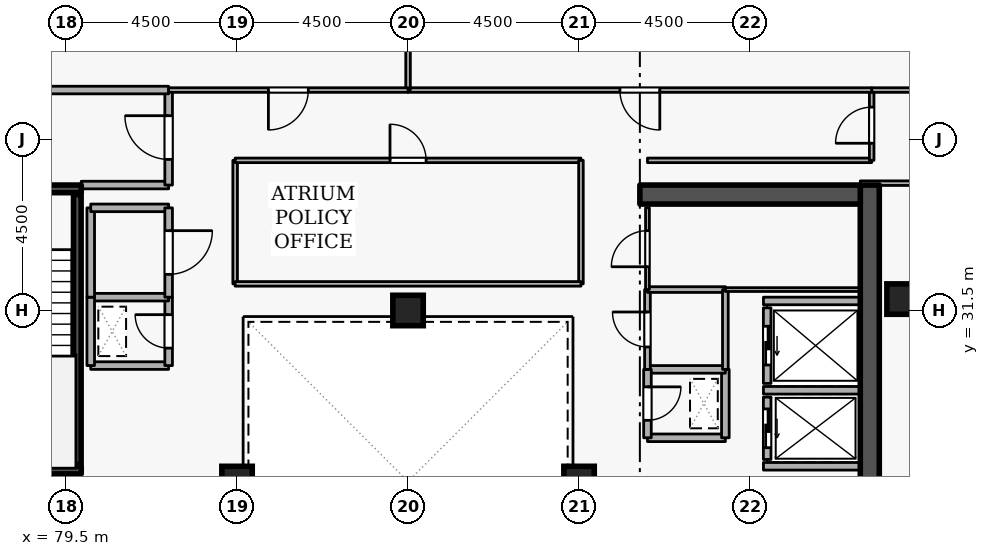
"""IFC4 building model, lengths in metres.
Left out: names, types, materials, properties, quantities, classifications, styles, units other than length and angle.
Written with IfcOpenShell. Run it as: python <this file> out.ifc"""

import sys

from ifc_helpers import new_model, si_unit, direction, frame, frame_2d, origin, origin_2d, place, context, subcontext, project, spatial, rectangle, extrude, element, fill, save


model = new_model("IFC4")
c1 = context("Model", 3, precision=1e-05, world=origin(), true_north=direction((0.0, 1.0)))
c2 = subcontext(c1, "Body", "Model", "MODEL_VIEW")
j1 = project(units=[si_unit("LENGTHUNIT", "METRE"), si_unit("PLANEANGLEUNIT", "RADIAN")], contexts=[c1])
p1 = place(None, origin())
s1 = spatial("IfcSite", under=j1, at=p1, CompositionType="ELEMENT")
p2 = place(p1, origin())
s2 = spatial("IfcBuilding", under=s1, at=p2, CompositionType="ELEMENT")
p3 = place(p2, frame((0.0, 0.0, 254.7)))
s3 = spatial("IfcBuildingStorey", under=s2, at=p3, CompositionType="ELEMENT", Elevation=254.7)
p4 = place(p3, frame((100.65, 19.2, 0.0), z_axis=(0.0, 0.0, 1.0), x_axis=(0.0, 1.0, 0.0)))
e1 = element("IfcWall", 1, at=p4, inside=s3, PredefinedType="SHEAR", context=c2, shape_type="SweptSolid", body=[
    extrude(rectangle(XDim=15.6, YDim=0.5, at=frame_2d((7.8, 0.0))), origin(), (0.0, 0.0, 1.0), 3.6),
])
p5 = place(p3, frame((94.6, 34.55, 0.0), z_axis=(0.0, 0.0, 1.0), x_axis=(1.0, 0.0, 0.0)))
e2 = element("IfcWall", 2, at=p5, inside=s3, PredefinedType="SHEAR", context=c2, shape_type="SweptSolid", body=[
    extrude(rectangle(XDim=5.8, YDim=0.5, at=frame_2d((2.9, 0.0))), origin(), (0.0, 0.0, 1.0), 3.6),
])
for number, where, z_axis, x_axis in (
    (3, (101.5, 31.8, 0.0), (0.0, 0.0, 1.0), (1.0, 0.0, 0.0)),
    (4, (93.0, 27.0, 0.0), (0.0, 0.0, 1.0), (1.0, 0.0, 0.0)),
    (5, (84.0, 27.0, 0.0), (0.0, 0.0, 1.0), (1.0, 0.0, 0.0)),
    (6, (88.5, 31.5, 0.0), (0.0, 0.0, 1.0), (1.0, 0.0, 0.0)),
):
    element("IfcColumn", number, at=place(p3, frame(where, z_axis=z_axis, x_axis=x_axis)), inside=s3, PredefinedType="COLUMN", context=c2, shape_type="SweptSolid", body=[
        extrude(rectangle(XDim=0.8, YDim=0.8, at=origin_2d()), origin(), (0.0, 0.0, 1.0), 3.6),
    ])
p6 = place(p3, frame((97.95, 29.22, 0.0), z_axis=(0.0, 0.0, 1.0), x_axis=(0.0, -1.0, 0.0)))
e7 = element("IfcWall", 7, at=p6, inside=s3, PredefinedType="STANDARD", context=c2, shape_type="SweptSolid", body=[
    extrude(rectangle(XDim=1.64, YDim=0.2, at=frame_2d((0.82, 0.0))), origin(), (0.0, 0.0, 1.0), 3.32),
])
p7 = place(p6, frame((0.31, 0.0, 0.0)))
e8 = element("IfcOpeningElement", 8, at=p7, cuts=e7, PredefinedType="OPENING", context=c2, shape_type="SweptSolid", body=[
    extrude(rectangle(XDim=1.02, YDim=2.06, at=frame_2d((0.51, 1.03))), frame((0.0, 0.11, 0.0), z_axis=(0.0, -1.0, 0.0), x_axis=(1.0, 0.0, 0.0)), (0.0, 0.0, 1.0), 0.22),
])
p8 = place(p3, frame((97.95, 31.57, 0.0), z_axis=(0.0, 0.0, 1.0), x_axis=(0.0, -1.0, 0.0)))
e9 = element("IfcWall", 9, at=p8, inside=s3, PredefinedType="STANDARD", context=c2, shape_type="SweptSolid", body=[
    extrude(rectangle(XDim=1.99, YDim=0.2, at=frame_2d((0.995, 0.0))), origin(), (0.0, 0.0, 1.0), 3.32),
])
p9 = place(p8, frame((0.485, 0.0, 0.0)))
e10 = element("IfcOpeningElement", 10, at=p9, cuts=e9, PredefinedType="OPENING", context=c2, shape_type="SweptSolid", body=[
    extrude(rectangle(XDim=1.02, YDim=2.06, at=frame_2d((0.51, 1.03))), frame((0.0, 0.11, 0.0), z_axis=(0.0, -1.0, 0.0), x_axis=(1.0, 0.0, 0.0)), (0.0, 0.0, 1.0), 0.22),
])
for number, where, z_axis, x_axis in (
    (11, (97.852, 29.4, 0.0), (0.0, 0.0, 1.0), (1.0, 0.0, 0.0)),
    (12, (97.852, 27.4, 0.0), (0.0, 0.0, 1.0), (1.0, 0.0, 0.0)),
    (13, (97.852, 31.75, 0.0), (0.0, 0.0, 1.0), (1.0, 0.0, 0.0)),
):
    element("IfcWall", number, at=place(p3, frame(where, z_axis=z_axis, x_axis=x_axis)), inside=s3, PredefinedType="STANDARD", context=c2, shape_type="SweptSolid", body=[
        extrude(rectangle(XDim=2.536, YDim=0.2, at=frame_2d((1.268, 0.0))), origin(), (0.0, 0.0, 1.0), 3.32),
    ])
p10 = place(p3, frame((76.55, 34.7, 0.0), z_axis=(0.0, 0.0, 1.0), x_axis=(1.0, 0.0, 0.0)))
e14 = element("IfcWall", 14, at=p10, inside=s3, PredefinedType="SHEAR", context=c2, shape_type="SweptSolid", body=[
    extrude(rectangle(XDim=3.35, YDim=0.2, at=frame_2d((1.675, 0.0))), origin(), (0.0, 0.0, 1.0), 3.6),
])
p11 = place(p10, frame((1.125, 0.0, 0.0)))
e15 = element("IfcOpeningElement", 15, at=p11, cuts=e14, PredefinedType="OPENING", context=c2, shape_type="SweptSolid", body=[
    extrude(rectangle(XDim=1.1, YDim=2.1, at=frame_2d((0.55, 1.05))), frame((0.0, 0.11, 0.0), z_axis=(0.0, -1.0, 0.0), x_axis=(1.0, 0.0, 0.0)), (0.0, 0.0, 1.0), 0.22),
])
p12 = place(p3, frame((79.9, 27.3, 0.0), z_axis=(0.0, 0.0, 1.0), x_axis=(-1.0, 0.0, 0.0)))
e16 = element("IfcWall", 16, at=p12, inside=s3, PredefinedType="SHEAR", context=c2, shape_type="SweptSolid", body=[
    extrude(rectangle(XDim=3.35, YDim=0.2, at=frame_2d((1.675, 0.0))), origin(), (0.0, 0.0, 1.0), 3.6),
])
p13 = place(p3, frame((79.797, 27.45, 0.0), z_axis=(0.0, 0.0, 1.0), x_axis=(0.0, 1.0, 0.0)))
e17 = element("IfcWall", 17, at=p13, inside=s3, PredefinedType="SHEAR", context=c2, shape_type="SweptSolid", body=[
    extrude(rectangle(XDim=7.1, YDim=0.2, at=frame_2d((3.55, 0.0))), origin(), (0.0, 0.0, 1.0), 3.6),
])
p14 = place(p3, frame((79.9, 34.8, 0.0), z_axis=(0.0, 0.0, 1.0), x_axis=(1.0, 0.0, 0.0)))
e18 = element("IfcWall", 18, at=p14, inside=s3, PredefinedType="STANDARD", context=c2, shape_type="SweptSolid", body=[
    extrude(rectangle(XDim=2.3, YDim=0.2, at=frame_2d((1.15, 0.0))), origin(), (0.0, 0.0, 1.0), 2.525),
])
p15 = place(p3, frame((82.2, 34.8, 0.0), z_axis=(0.0, 0.0, 1.0), x_axis=(0.0, 1.0, 0.0)))
e19 = element("IfcWall", 19, at=p15, inside=s3, PredefinedType="STANDARD", context=c2, shape_type="SweptSolid", body=[
    extrude(rectangle(XDim=2.5, YDim=0.2, at=frame_2d((1.25, 0.0))), origin(), (0.0, 0.0, 1.0), 3.32),
])
p16 = place(p15, frame((0.675, 0.0, 0.0)))
e20 = element("IfcOpeningElement", 20, at=p16, cuts=e19, PredefinedType="OPENING", context=c2, shape_type="SweptSolid", body=[
    extrude(rectangle(XDim=1.15, YDim=2.1, at=frame_2d((0.575, 1.05))), frame((0.0, 0.11, 0.0), z_axis=(0.0, -1.0, 0.0), x_axis=(1.0, 0.0, 0.0)), (0.0, 0.0, 1.0), 0.22),
])
p17 = place(p3, frame((82.2, 37.3, 0.0), z_axis=(0.0, 0.0, 1.0), x_axis=(-1.0, 0.0, 0.0)))
e21 = element("IfcWall", 21, at=p17, inside=s3, PredefinedType="STANDARD", context=c2, shape_type="SweptSolid", body=[
    extrude(rectangle(XDim=5.7, YDim=0.2, at=frame_2d((2.85, 0.0))), origin(), (0.0, 0.0, 1.0), 3.32),
])
p18 = place(p3, frame((94.8, 28.15, 0.0), z_axis=(0.0, 0.0, 1.0), x_axis=(1.0, 0.0, 0.0)))
e22 = element("IfcWall", 22, at=p18, inside=s3, PredefinedType="STANDARD", context=c2, shape_type="SweptSolid", body=[
    extrude(rectangle(XDim=2.05, YDim=0.2, at=frame_2d((1.025, 0.0))), origin(), (0.0, 0.0, 1.0), 3.32),
])
p19 = place(p3, frame((96.85, 28.15, 0.0), z_axis=(0.0, 0.0, 1.0), x_axis=(0.0, 1.0, 0.0)))
e23 = element("IfcWall", 23, at=p19, inside=s3, PredefinedType="STANDARD", context=c2, shape_type="SweptSolid", body=[
    extrude(rectangle(XDim=1.8, YDim=0.2, at=frame_2d((0.9, 0.0))), origin(), (0.0, 0.0, 1.0), 3.32),
])
p20 = place(p3, frame((96.85, 29.95, 0.0), z_axis=(0.0, 0.0, 1.0), x_axis=(-1.0, 0.0, 0.0)))
e24 = element("IfcWall", 24, at=p20, inside=s3, PredefinedType="STANDARD", context=c2, shape_type="SweptSolid", body=[
    extrude(rectangle(XDim=2.05, YDim=0.2, at=frame_2d((1.025, 0.0))), origin(), (0.0, 0.0, 1.0), 3.32),
])
p21 = place(p3, frame((94.8, 29.95, 0.0), z_axis=(0.0, 0.0, 1.0), x_axis=(0.0, -1.0, 0.0)))
e25 = element("IfcWall", 25, at=p21, inside=s3, PredefinedType="STANDARD", context=c2, shape_type="SweptSolid", body=[
    extrude(rectangle(XDim=1.8, YDim=0.2, at=frame_2d((0.9, 0.0))), origin(), (0.0, 0.0, 1.0), 3.32),
])
p22 = place(p21, frame((0.46, 0.0, 0.0)))
e26 = element("IfcOpeningElement", 26, at=p22, cuts=e25, PredefinedType="OPENING", context=c2, shape_type="SweptSolid", body=[
    extrude(rectangle(XDim=0.88, YDim=2.04, at=frame_2d((0.44, 1.02))), frame((0.0, 0.11, 0.0), z_axis=(0.0, -1.0, 0.0), x_axis=(1.0, 0.0, 0.0)), (0.0, 0.0, 1.0), 0.22),
])
p23 = place(p3, frame((80.15, 30.05, 0.0), z_axis=(0.0, 0.0, 1.0), x_axis=(1.0, 0.0, 0.0)))
e27 = element("IfcWall", 27, at=p23, inside=s3, PredefinedType="STANDARD", context=c2, shape_type="SweptSolid", body=[
    extrude(rectangle(XDim=2.05, YDim=0.2, at=frame_2d((1.025, 0.0))), origin(), (0.0, 0.0, 1.0), 3.32),
])
p24 = place(p3, frame((82.2, 30.05, 0.0), z_axis=(0.0, 0.0, 1.0), x_axis=(0.0, 1.0, 0.0)))
e28 = element("IfcWall", 28, at=p24, inside=s3, PredefinedType="STANDARD", context=c2, shape_type="SweptSolid", body=[
    extrude(rectangle(XDim=1.8, YDim=0.2, at=frame_2d((0.9, 0.0))), origin(), (0.0, 0.0, 1.0), 3.32),
])
p25 = place(p24, frame((0.46, 0.0, 0.0)))
e29 = element("IfcOpeningElement", 29, at=p25, cuts=e28, PredefinedType="OPENING", context=c2, shape_type="SweptSolid", body=[
    extrude(rectangle(XDim=0.88, YDim=2.04, at=frame_2d((0.44, 1.02))), frame((0.0, 0.11, 0.0), z_axis=(0.0, -1.0, 0.0), x_axis=(1.0, 0.0, 0.0)), (0.0, 0.0, 1.0), 0.22),
])
p26 = place(p3, frame((82.2, 31.85, 0.0), z_axis=(0.0, 0.0, 1.0), x_axis=(-1.0, 0.0, 0.0)))
e30 = element("IfcWall", 30, at=p26, inside=s3, PredefinedType="STANDARD", context=c2, shape_type="SweptSolid", body=[
    extrude(rectangle(XDim=2.05, YDim=0.2, at=frame_2d((1.025, 0.0))), origin(), (0.0, 0.0, 1.0), 3.32),
])
p27 = place(p3, frame((80.15, 31.85, 0.0), z_axis=(0.0, 0.0, 1.0), x_axis=(0.0, -1.0, 0.0)))
e31 = element("IfcWall", 31, at=p27, inside=s3, PredefinedType="STANDARD", context=c2, shape_type="SweptSolid", body=[
    extrude(rectangle(XDim=1.8, YDim=0.2, at=frame_2d((0.9, 0.0))), origin(), (0.0, 0.0, 1.0), 3.32),
])
p28 = place(p3, frame((80.15, 31.85, 0.0), z_axis=(0.0, 0.0, 1.0), x_axis=(0.0, 1.0, 0.0)))
e32 = element("IfcWall", 32, at=p28, inside=s3, PredefinedType="STANDARD", context=c2, shape_type="SweptSolid", body=[
    extrude(rectangle(XDim=2.35, YDim=0.2, at=frame_2d((1.175, 0.0))), origin(), (0.0, 0.0, 1.0), 3.32),
])
p29 = place(p3, frame((80.15, 34.2, 0.0), z_axis=(0.0, 0.0, 1.0), x_axis=(1.0, 0.0, 0.0)))
e33 = element("IfcWall", 33, at=p29, inside=s3, PredefinedType="STANDARD", context=c2, shape_type="SweptSolid", body=[
    extrude(rectangle(XDim=2.05, YDim=0.2, at=frame_2d((1.025, 0.0))), origin(), (0.0, 0.0, 1.0), 2.525),
])
p30 = place(p3, frame((82.2, 34.2, 0.0), z_axis=(0.0, 0.0, 1.0), x_axis=(0.0, -1.0, 0.0)))
e34 = element("IfcWall", 34, at=p30, inside=s3, PredefinedType="STANDARD", context=c2, shape_type="SweptSolid", body=[
    extrude(rectangle(XDim=2.35, YDim=0.2, at=frame_2d((1.175, 0.0))), origin(), (0.0, 0.0, 1.0), 3.32),
])
p31 = place(p30, frame((0.6, 0.0, 0.0)))
e35 = element("IfcOpeningElement", 35, at=p31, cuts=e34, PredefinedType="OPENING", context=c2, shape_type="SweptSolid", body=[
    extrude(rectangle(XDim=1.15, YDim=2.1, at=frame_2d((0.575, 1.05))), frame((0.0, 0.11, 0.0), z_axis=(0.0, -1.0, 0.0), x_axis=(1.0, 0.0, 0.0)), (0.0, 0.0, 1.0), 0.22),
])
p32 = place(p3, frame((94.8, 29.95, 0.0), z_axis=(0.0, 0.0, 1.0), x_axis=(0.0, 1.0, 0.0)))
e36 = element("IfcWall", 36, at=p32, inside=s3, PredefinedType="PARTITIONING", context=c2, shape_type="SweptSolid", body=[
    extrude(rectangle(XDim=2.1, YDim=0.15, at=frame_2d((1.05, 0.0))), origin(), (0.0, 0.0, 1.0), 3.32),
])
p33 = place(p32, frame((0.59, 0.0, 0.0)))
e37 = element("IfcOpeningElement", 37, at=p33, cuts=e36, PredefinedType="OPENING", context=c2, shape_type="SweptSolid", body=[
    extrude(rectangle(XDim=0.92, YDim=2.08, at=frame_2d((0.46, 1.04))), frame((0.0, 0.085, 0.0), z_axis=(0.0, -1.0, 0.0), x_axis=(1.0, 0.0, 0.0)), (0.0, 0.0, 1.0), 0.17),
])
p34 = place(p3, frame((94.8, 32.05, 0.0), z_axis=(0.0, 0.0, 1.0), x_axis=(1.0, 0.0, 0.0)))
e38 = element("IfcWall", 38, at=p34, inside=s3, PredefinedType="PARTITIONING", context=c2, shape_type="SweptSolid", body=[
    extrude(rectangle(XDim=2.05, YDim=0.15, at=frame_2d((1.025, 0.0))), origin(), (0.0, 0.0, 1.0), 3.32),
])
p35 = place(p3, frame((96.85, 32.05, 0.0), z_axis=(0.0, 0.0, 1.0), x_axis=(0.0, -1.0, 0.0)))
e39 = element("IfcWall", 39, at=p35, inside=s3, PredefinedType="PARTITIONING", context=c2, shape_type="SweptSolid", body=[
    extrude(rectangle(XDim=2.1, YDim=0.15, at=frame_2d((1.05, 0.0))), origin(), (0.0, 0.0, 1.0), 3.32),
])
p36 = place(p3, frame((94.8, 32.05, 0.0), z_axis=(0.0, 0.0, 1.0), x_axis=(0.0, 1.0, 0.0)))
e40 = element("IfcWall", 40, at=p36, inside=s3, PredefinedType="PARTITIONING", context=c2, shape_type="SweptSolid", body=[
    extrude(rectangle(XDim=2.15, YDim=0.1, at=frame_2d((1.075, 0.0))), origin(), (0.0, 0.0, 1.0), 3.32),
])
p37 = place(p36, frame((0.6, 0.0, 0.0)))
e41 = element("IfcOpeningElement", 41, at=p37, cuts=e40, PredefinedType="OPENING", context=c2, shape_type="SweptSolid", body=[
    extrude(rectangle(XDim=0.95, YDim=2.1, at=frame_2d((0.475, 1.05))), frame((0.0, 0.06, 0.0), z_axis=(0.0, -1.0, 0.0), x_axis=(1.0, 0.0, 0.0)), (0.0, 0.0, 1.0), 0.12),
])
p38 = place(p3, frame((100.4, 32.05, 0.0), z_axis=(0.0, 0.0, 1.0), x_axis=(-1.0, 0.0, 0.0)))
e42 = element("IfcWall", 42, at=p38, inside=s3, PredefinedType="PARTITIONING", context=c2, shape_type="SweptSolid", body=[
    extrude(rectangle(XDim=3.55, YDim=0.1, at=frame_2d((1.775, 0.0))), origin(), (0.0, 0.0, 1.0), 3.32),
])
p39 = place(p3, frame((94.8, 35.45, 0.0), z_axis=(0.0, 0.0, 1.0), x_axis=(1.0, 0.0, 0.0)))
e43 = element("IfcWall", 43, at=p39, inside=s3, PredefinedType="PARTITIONING", context=c2, shape_type="SweptSolid", body=[
    extrude(rectangle(XDim=5.9, YDim=0.12, at=frame_2d((2.95, 0.0))), origin(), (0.0, 0.0, 1.0), 3.32),
])
p40 = place(p3, frame((100.7, 35.45, 0.0), z_axis=(0.0, 0.0, 1.0), x_axis=(0.0, 1.0, 0.0)))
e44 = element("IfcWall", 44, at=p40, inside=s3, PredefinedType="PARTITIONING", context=c2, shape_type="SweptSolid", body=[
    extrude(rectangle(XDim=1.85, YDim=0.12, at=frame_2d((0.925, 0.0))), origin(), (0.0, 0.0, 1.0), 3.32),
])
p41 = place(p40, frame((0.45, 0.0, 0.0)))
e45 = element("IfcOpeningElement", 45, at=p41, cuts=e44, PredefinedType="OPENING", context=c2, shape_type="SweptSolid", body=[
    extrude(rectangle(XDim=0.95, YDim=2.1, at=frame_2d((0.475, 1.05))), frame((0.0, 0.07, 0.0), z_axis=(0.0, -1.0, 0.0), x_axis=(1.0, 0.0, 0.0)), (0.0, 0.0, 1.0), 0.14),
])
p42 = place(p3, frame((100.7, 37.3, 0.0), z_axis=(0.0, 0.0, 1.0), x_axis=(1.0, 0.0, 0.0)))
e46 = element("IfcWall", 46, at=p42, inside=s3, PredefinedType="PARTITIONING", context=c2, shape_type="SweptSolid", body=[
    extrude(rectangle(XDim=11.52, YDim=0.12, at=frame_2d((5.76, 0.0))), origin(), (0.0, 0.0, 1.0), 3.32),
])
p43 = place(p3, frame((112.22, 34.85, 0.0), z_axis=(0.0, 0.0, 1.0), x_axis=(-1.0, 0.0, 0.0)))
e47 = element("IfcWall", 47, at=p43, inside=s3, PredefinedType="PARTITIONING", context=c2, shape_type="SweptSolid", body=[
    extrude(rectangle(XDim=11.82, YDim=0.12, at=frame_2d((5.91, 0.0))), origin(), (0.0, 0.0, 1.0), 2.525),
])
p44 = place(p3, frame((100.7, 37.3, 0.0), z_axis=(0.0, 0.0, 1.0), x_axis=(-1.0, 0.0, 0.0)))
e48 = element("IfcWall", 48, at=p44, inside=s3, PredefinedType="PARTITIONING", context=c2, shape_type="SweptSolid", body=[
    extrude(rectangle(XDim=12.2, YDim=0.12, at=frame_2d((6.1, 0.0))), origin(), (0.0, 0.0, 1.0), 3.32),
])
p45 = place(p44, frame((5.575, 0.0, 0.0)))
e49 = element("IfcOpeningElement", 49, at=p45, cuts=e48, PredefinedType="OPENING", context=c2, shape_type="SweptSolid", body=[
    extrude(rectangle(XDim=1.05, YDim=2.1, at=frame_2d((0.525, 1.05))), frame((0.0, 0.07, 0.0), z_axis=(0.0, -1.0, 0.0), x_axis=(1.0, 0.0, 0.0)), (0.0, 0.0, 1.0), 0.14),
])
p46 = place(p3, frame((88.5, 37.3, 0.0), z_axis=(0.0, 0.0, 1.0), x_axis=(0.0, 1.0, 0.0)))
e50 = element("IfcWall", 50, at=p46, inside=s3, PredefinedType="PARTITIONING", context=c2, shape_type="SweptSolid", body=[
    extrude(rectangle(XDim=13.42, YDim=0.12, at=frame_2d((6.71, 0.0))), origin(), (0.0, 0.0, 1.0), 2.912),
])
p47 = place(p3, frame((88.5, 37.3, 0.0), z_axis=(0.0, 0.0, 1.0), x_axis=(-1.0, 0.0, 0.0)))
e51 = element("IfcWall", 51, at=p47, inside=s3, PredefinedType="PARTITIONING", context=c2, shape_type="SweptSolid", body=[
    extrude(rectangle(XDim=6.3, YDim=0.12, at=frame_2d((3.15, 0.0))), origin(), (0.0, 0.0, 1.0), 3.32),
])
p48 = place(p47, frame((2.625, 0.0, 0.0)))
e52 = element("IfcOpeningElement", 52, at=p48, cuts=e51, PredefinedType="OPENING", context=c2, shape_type="SweptSolid", body=[
    extrude(rectangle(XDim=1.05, YDim=2.1, at=frame_2d((0.525, 1.05))), frame((0.0, 0.07, 0.0), z_axis=(0.0, -1.0, 0.0), x_axis=(1.0, 0.0, 0.0)), (0.0, 0.0, 1.0), 0.14),
])
p49 = place(p3, frame((83.95, 32.2, 0.0), z_axis=(0.0, 0.0, 1.0), x_axis=(0.0, 1.0, 0.0)))
e53 = element("IfcWall", 53, at=p49, inside=s3, PredefinedType="PARTITIONING", context=c2, shape_type="SweptSolid", body=[
    extrude(rectangle(XDim=3.25, YDim=0.12, at=frame_2d((1.625, 0.0))), origin(), (0.0, 0.0, 1.0), 3.32),
])
p50 = place(p3, frame((83.95, 35.45, 0.0), z_axis=(0.0, 0.0, 1.0), x_axis=(1.0, 0.0, 0.0)))
e54 = element("IfcWall", 54, at=p50, inside=s3, PredefinedType="PARTITIONING", context=c2, shape_type="SweptSolid", body=[
    extrude(rectangle(XDim=9.1, YDim=0.12, at=frame_2d((4.55, 0.0))), origin(), (0.0, 0.0, 1.0), 3.32),
])
p51 = place(p50, frame((4.075, 0.0, 0.0)))
e55 = element("IfcOpeningElement", 55, at=p51, cuts=e54, PredefinedType="OPENING", context=c2, shape_type="SweptSolid", body=[
    extrude(rectangle(XDim=0.95, YDim=2.1, at=frame_2d((0.475, 1.05))), frame((0.0, 0.07, 0.0), z_axis=(0.0, -1.0, 0.0), x_axis=(1.0, 0.0, 0.0)), (0.0, 0.0, 1.0), 0.14),
])
p52 = place(p3, frame((93.05, 35.45, 0.0), z_axis=(0.0, 0.0, 1.0), x_axis=(0.0, -1.0, 0.0)))
e56 = element("IfcWall", 56, at=p52, inside=s3, PredefinedType="PARTITIONING", context=c2, shape_type="SweptSolid", body=[
    extrude(rectangle(XDim=3.25, YDim=0.12, at=frame_2d((1.625, 0.0))), origin(), (0.0, 0.0, 1.0), 3.32),
])
p53 = place(p3, frame((93.05, 32.2, 0.0), z_axis=(0.0, 0.0, 1.0), x_axis=(-1.0, 0.0, 0.0)))
e57 = element("IfcWall", 57, at=p53, inside=s3, PredefinedType="PARTITIONING", context=c2, shape_type="SweptSolid", body=[
    extrude(rectangle(XDim=9.1, YDim=0.12, at=frame_2d((4.55, 0.0))), origin(), (0.0, 0.0, 1.0), 3.32),
])
p54 = place(p7, origin())
e58 = element("IfcDoor", 58, at=p54, inside=s3, OperationType="SLIDING_TO_LEFT", PredefinedType="DOOR", context=c2, shape_type="SweptSolid", body=[
    extrude(rectangle(XDim=1.02, YDim=2.06, at=frame_2d((0.51, 1.03))), frame((0.0, 0.025, 0.0), z_axis=(0.0, -1.0, 0.0), x_axis=(1.0, 0.0, 0.0)), (0.0, 0.0, 1.0), 0.05),
])
fill(e8, e58)
p55 = place(p9, origin())
e59 = element("IfcDoor", 59, at=p55, inside=s3, OperationType="SLIDING_TO_LEFT", PredefinedType="DOOR", context=c2, shape_type="SweptSolid", body=[
    extrude(rectangle(XDim=1.02, YDim=2.06, at=frame_2d((0.51, 1.03))), frame((0.0, 0.025, 0.0), z_axis=(0.0, -1.0, 0.0), x_axis=(1.0, 0.0, 0.0)), (0.0, 0.0, 1.0), 0.05),
])
fill(e10, e59)
p56 = place(p16, origin())
e60 = element("IfcDoor", 60, at=p56, inside=s3, OperationType="SINGLE_SWING_RIGHT", PredefinedType="DOOR", context=c2, shape_type="SweptSolid", body=[
    extrude(rectangle(XDim=1.15, YDim=2.1, at=frame_2d((0.575, 1.05))), frame((0.0, 0.025, 0.0), z_axis=(0.0, -1.0, 0.0), x_axis=(1.0, 0.0, 0.0)), (0.0, 0.0, 1.0), 0.05),
])
fill(e20, e60)
p57 = place(p22, origin())
e61 = element("IfcDoor", 61, at=p57, inside=s3, OperationType="SINGLE_SWING_LEFT", PredefinedType="DOOR", context=c2, shape_type="SweptSolid", body=[
    extrude(rectangle(XDim=0.88, YDim=2.04, at=frame_2d((0.44, 1.02))), frame((0.0, 0.025, 0.0), z_axis=(0.0, -1.0, 0.0), x_axis=(1.0, 0.0, 0.0)), (0.0, 0.0, 1.0), 0.05),
])
fill(e26, e61)
p58 = place(p25, origin())
e62 = element("IfcDoor", 62, at=p58, inside=s3, OperationType="SINGLE_SWING_RIGHT", PredefinedType="DOOR", context=c2, shape_type="SweptSolid", body=[
    extrude(rectangle(XDim=0.88, YDim=2.04, at=frame_2d((0.44, 1.02))), frame((0.0, 0.025, 0.0), z_axis=(0.0, -1.0, 0.0), x_axis=(1.0, 0.0, 0.0)), (0.0, 0.0, 1.0), 0.05),
])
fill(e29, e62)
p59 = place(p33, origin())
e63 = element("IfcDoor", 63, at=p59, inside=s3, OperationType="SINGLE_SWING_RIGHT", PredefinedType="DOOR", context=c2, shape_type="SweptSolid", body=[
    extrude(rectangle(XDim=0.92, YDim=2.08, at=frame_2d((0.46, 1.04))), frame((0.0, 0.025, 0.0), z_axis=(0.0, -1.0, 0.0), x_axis=(1.0, 0.0, 0.0)), (0.0, 0.0, 1.0), 0.05),
])
fill(e37, e63)
p60 = place(p37, origin())
e64 = element("IfcDoor", 64, at=p60, inside=s3, OperationType="SINGLE_SWING_LEFT", PredefinedType="DOOR", context=c2, shape_type="SweptSolid", body=[
    extrude(rectangle(XDim=0.95, YDim=2.1, at=frame_2d((0.475, 1.05))), frame((0.0, 0.025, 0.0), z_axis=(0.0, -1.0, 0.0), x_axis=(1.0, 0.0, 0.0)), (0.0, 0.0, 1.0), 0.05),
])
fill(e41, e64)
p61 = place(p31, origin())
e65 = element("IfcDoor", 65, at=p61, inside=s3, OperationType="SINGLE_SWING_LEFT", PredefinedType="DOOR", context=c2, shape_type="SweptSolid", body=[
    extrude(rectangle(XDim=1.15, YDim=2.1, at=frame_2d((0.575, 1.05))), frame((0.0, 0.025, 0.0), z_axis=(0.0, -1.0, 0.0), x_axis=(1.0, 0.0, 0.0)), (0.0, 0.0, 1.0), 0.05),
])
fill(e35, e65)
p62 = place(p41, origin())
e66 = element("IfcDoor", 66, at=p62, inside=s3, OperationType="SINGLE_SWING_LEFT", PredefinedType="DOOR", context=c2, shape_type="SweptSolid", body=[
    extrude(rectangle(XDim=0.95, YDim=2.1, at=frame_2d((0.475, 1.05))), frame((0.0, 0.025, 0.0), z_axis=(0.0, -1.0, 0.0), x_axis=(1.0, 0.0, 0.0)), (0.0, 0.0, 1.0), 0.05),
])
fill(e45, e66)
p63 = place(p45, origin())
e67 = element("IfcDoor", 67, at=p63, inside=s3, OperationType="SINGLE_SWING_LEFT", PredefinedType="DOOR", context=c2, shape_type="SweptSolid", body=[
    extrude(rectangle(XDim=1.05, YDim=2.1, at=frame_2d((0.525, 1.05))), frame((0.0, 0.025, 0.0), z_axis=(0.0, -1.0, 0.0), x_axis=(1.0, 0.0, 0.0)), (0.0, 0.0, 1.0), 0.05),
])
fill(e49, e67)
p64 = place(p48, origin())
e68 = element("IfcDoor", 68, at=p64, inside=s3, OperationType="SINGLE_SWING_RIGHT", PredefinedType="DOOR", context=c2, shape_type="SweptSolid", body=[
    extrude(rectangle(XDim=1.05, YDim=2.1, at=frame_2d((0.525, 1.05))), frame((0.0, 0.025, 0.0), z_axis=(0.0, -1.0, 0.0), x_axis=(1.0, 0.0, 0.0)), (0.0, 0.0, 1.0), 0.05),
])
fill(e52, e68)
p65 = place(p51, origin())
e69 = element("IfcDoor", 69, at=p65, inside=s3, OperationType="SINGLE_SWING_LEFT", PredefinedType="DOOR", context=c2, shape_type="SweptSolid", body=[
    extrude(rectangle(XDim=0.95, YDim=2.1, at=frame_2d((0.475, 1.05))), frame((0.0, 0.025, 0.0), z_axis=(0.0, -1.0, 0.0), x_axis=(1.0, 0.0, 0.0)), (0.0, 0.0, 1.0), 0.05),
])
fill(e55, e69)
save(model, sys.argv[1])
